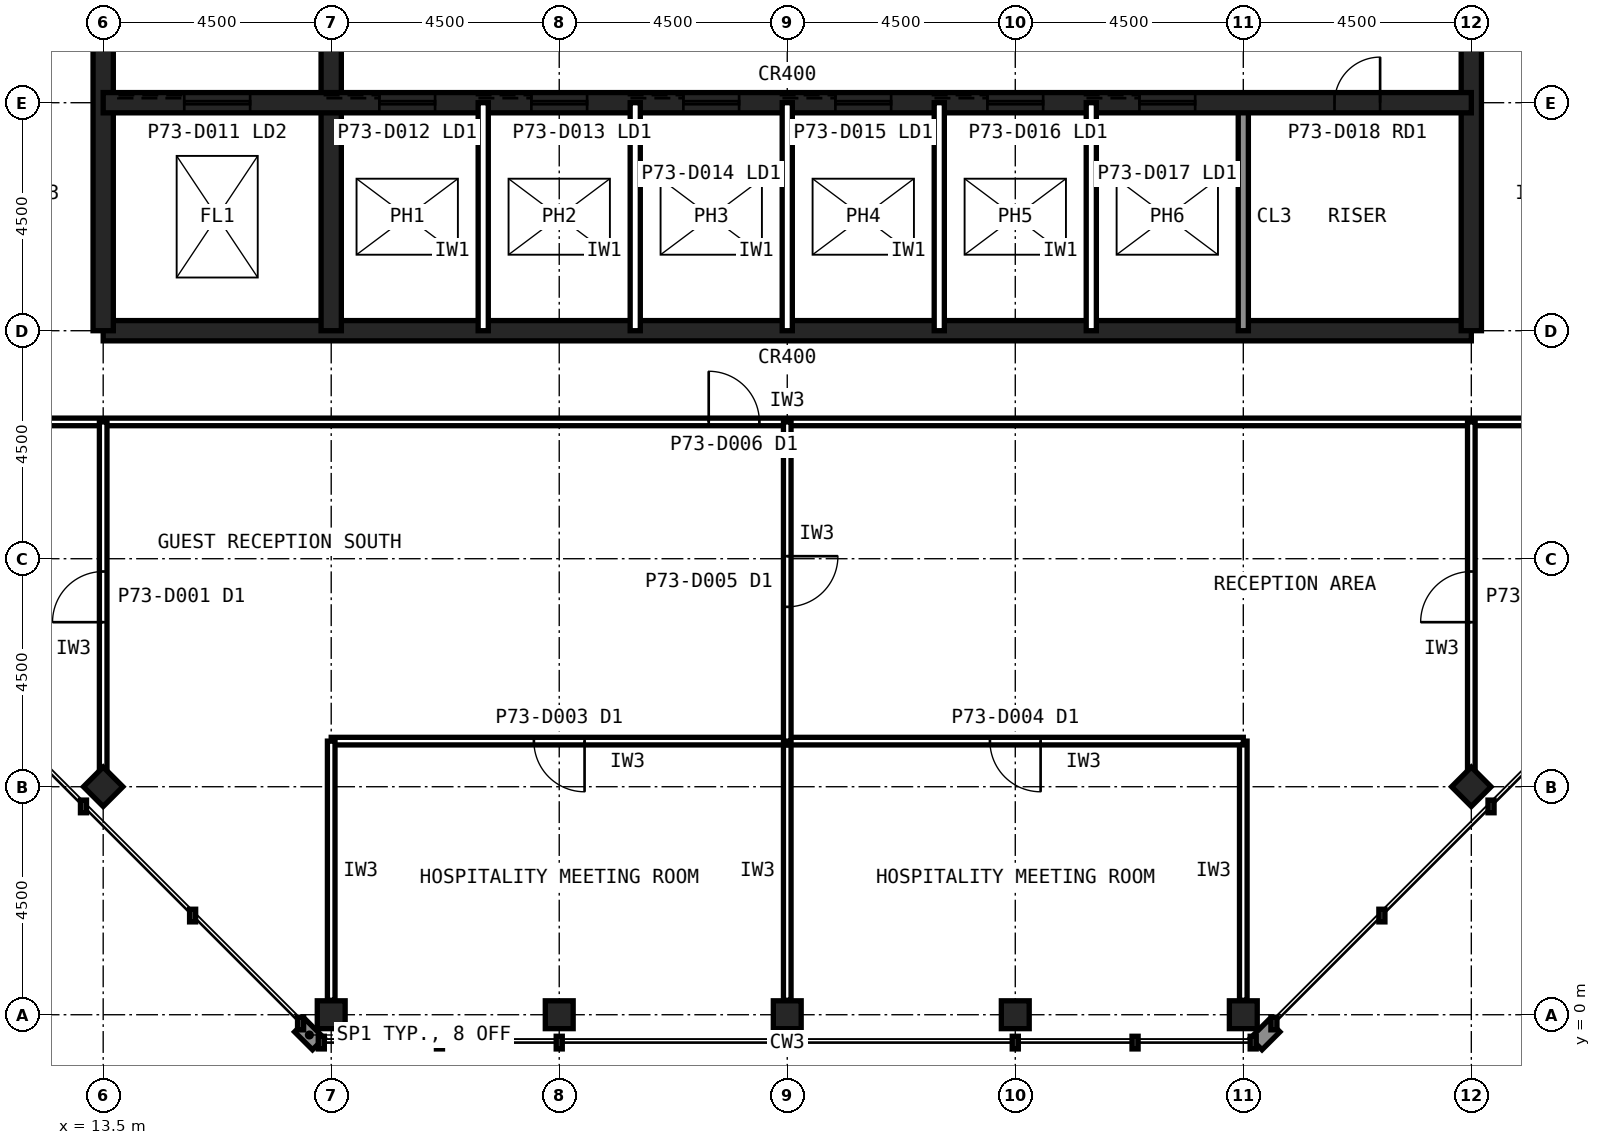
"""IFC4 building model, lengths in metres.
Left out: names, types, materials, properties, quantities, classifications, styles, units other than length and angle.
Written with IfcOpenShell. Run it as: python <this file> out.ifc"""

import sys

from ifc_helpers import new_model, si_unit, direction, frame, frame_2d, origin, origin_2d, place, context, subcontext, project, spatial, rectangle, hollow_rectangle, extrude, element, fill, save


model = new_model("IFC4")
c1 = context("Model", 3, precision=1e-05, world=origin(), true_north=direction((0.0, 1.0)))
c2 = subcontext(c1, "Body", "Model", "MODEL_VIEW")
j1 = project(units=[si_unit("LENGTHUNIT", "METRE"), si_unit("PLANEANGLEUNIT", "RADIAN")], contexts=[c1])
p1 = place(None, origin())
s1 = spatial("IfcSite", under=j1, at=p1, CompositionType="ELEMENT")
p2 = place(p1, origin())
s2 = spatial("IfcBuilding", under=s1, at=p2, CompositionType="ELEMENT")
p3 = place(p2, frame((0.0, 0.0, 302.6)))
s3 = spatial("IfcBuildingStorey", under=s2, at=p3, CompositionType="ELEMENT", Elevation=302.6)
for number, where, z_axis, x_axis in (
    (1, (18.0, 0.0, 0.0), (0.0, 0.0, 1.0), (1.0, 0.0, 0.0)),
    (2, (22.5, 0.0, 0.0), (0.0, 0.0, 1.0), (1.0, 0.0, 0.0)),
    (3, (27.0, 0.0, 0.0), (0.0, 0.0, 1.0), (1.0, 0.0, 0.0)),
    (4, (31.5, 0.0, 0.0), (0.0, 0.0, 1.0), (1.0, 0.0, 0.0)),
    (5, (36.0, 0.0, 0.0), (0.0, 0.0, 1.0), (1.0, 0.0, 0.0)),
    (6, (13.5, 4.5, 0.0), (0.0, 0.0, 1.0), (0.707, 0.707, 0.0)),
    (7, (40.5, 4.5, 0.0), (0.0, 0.0, 1.0), (0.707, 0.707, 0.0)),
):
    element("IfcColumn", number, at=place(p3, frame(where, z_axis=z_axis, x_axis=x_axis)), inside=s3, PredefinedType="COLUMN", context=c2, shape_type="SweptSolid", body=[
        extrude(hollow_rectangle(XDim=0.55, YDim=0.55, WallThickness=0.025, at=origin_2d()), origin(), (0.0, 0.0, 1.0), 4.0),
    ])
p4 = place(p3, frame((13.5, 13.5, 0.0), z_axis=(0.0, 0.0, 1.0), x_axis=(1.0, 0.0, 0.0)))
e8 = element("IfcWall", 8, at=p4, inside=s3, PredefinedType="SHEAR", context=c2, shape_type="SweptSolid", body=[
    extrude(rectangle(XDim=27.0, YDim=0.4, at=frame_2d((13.5, 0.0))), origin(), (0.0, 0.0, 1.0), 4.0),
])
p5 = place(p3, frame((40.5, 13.5, 0.0), z_axis=(0.0, 0.0, 1.0), x_axis=(0.0, 1.0, 0.0)))
e9 = element("IfcWall", 9, at=p5, inside=s3, PredefinedType="SHEAR", context=c2, shape_type="SweptSolid", body=[
    extrude(rectangle(XDim=27.0, YDim=0.4, at=frame_2d((13.5, 0.0))), origin(), (0.0, 0.0, 1.0), 4.0),
])
p6 = place(p5, frame((5.85, 0.0, 0.0)))
e10 = element("IfcOpeningElement", 10, at=p6, cuts=e9, PredefinedType="OPENING", context=c2, shape_type="SweptSolid", body=[
    extrude(rectangle(XDim=1.8, YDim=2.1, at=frame_2d((0.9, 1.05))), frame((0.0, 0.21, 0.0), z_axis=(0.0, -1.0, 0.0), x_axis=(1.0, 0.0, 0.0)), (0.0, 0.0, 1.0), 0.42),
])
p7 = place(p5, frame((19.65, 0.0, 0.0)))
e11 = element("IfcOpeningElement", 11, at=p7, cuts=e9, PredefinedType="OPENING", context=c2, shape_type="SweptSolid", body=[
    extrude(rectangle(XDim=1.2, YDim=2.1, at=frame_2d((0.6, 1.05))), frame((0.0, 0.21, 0.0), z_axis=(0.0, -1.0, 0.0), x_axis=(1.0, 0.0, 0.0)), (0.0, 0.0, 1.0), 0.42),
])
p8 = place(p3, frame((13.5, 40.5, 0.0), z_axis=(0.0, 0.0, 1.0), x_axis=(0.0, -1.0, 0.0)))
e12 = element("IfcWall", 12, at=p8, inside=s3, PredefinedType="SHEAR", context=c2, shape_type="SweptSolid", body=[
    extrude(rectangle(XDim=27.0, YDim=0.4, at=frame_2d((13.5, 0.0))), origin(), (0.0, 0.0, 1.0), 4.0),
])
p9 = place(p8, frame((19.65, 0.0, 0.0)))
e13 = element("IfcOpeningElement", 13, at=p9, cuts=e12, PredefinedType="OPENING", context=c2, shape_type="SweptSolid", body=[
    extrude(rectangle(XDim=1.2, YDim=2.1, at=frame_2d((0.6, 1.05))), frame((0.0, 0.21, 0.0), z_axis=(0.0, -1.0, 0.0), x_axis=(1.0, 0.0, 0.0)), (0.0, 0.0, 1.0), 0.42),
])
p10 = place(p8, frame((5.85, 0.0, 0.0)))
e14 = element("IfcOpeningElement", 14, at=p10, cuts=e12, PredefinedType="OPENING", context=c2, shape_type="SweptSolid", body=[
    extrude(rectangle(XDim=1.8, YDim=2.1, at=frame_2d((0.9, 1.05))), frame((0.0, 0.21, 0.0), z_axis=(0.0, -1.0, 0.0), x_axis=(1.0, 0.0, 0.0)), (0.0, 0.0, 1.0), 0.42),
])
p11 = place(p3, frame((18.0, 13.5, 0.0), z_axis=(0.0, 0.0, 1.0), x_axis=(0.0, 1.0, 0.0)))
e15 = element("IfcWall", 15, at=p11, inside=s3, PredefinedType="SHEAR", context=c2, shape_type="SweptSolid", body=[
    extrude(rectangle(XDim=18.0, YDim=0.4, at=frame_2d((9.0, 0.0))), origin(), (0.0, 0.0, 1.0), 4.0),
])
p12 = place(p3, frame((36.0, 13.5, 0.0), z_axis=(0.0, 0.0, 1.0), x_axis=(0.0, 1.0, 0.0)))
e16 = element("IfcWall", 16, at=p12, inside=s3, PredefinedType="SOLIDWALL", context=c2, shape_type="SweptSolid", body=[
    extrude(rectangle(XDim=4.5, YDim=0.2, at=frame_2d((2.25, 0.0))), origin(), (0.0, 0.0, 1.0), 3.84),
])
p13 = place(p3, frame((13.5, 18.0, 0.0), z_axis=(0.0, 0.0, 1.0), x_axis=(1.0, 0.0, 0.0)))
e17 = element("IfcWall", 17, at=p13, inside=s3, PredefinedType="SHEAR", context=c2, shape_type="SweptSolid", body=[
    extrude(rectangle(XDim=27.0, YDim=0.4, at=frame_2d((13.5, 0.0))), origin(), (0.0, 0.0, 1.0), 4.0),
])
p14 = place(p13, frame((24.3, 0.0, 0.0)))
e18 = element("IfcOpeningElement", 18, at=p14, cuts=e17, PredefinedType="OPENING", context=c2, shape_type="SweptSolid", body=[
    extrude(rectangle(XDim=0.9, YDim=2.1, at=frame_2d((0.45, 1.05))), frame((0.0, 0.21, 0.0), z_axis=(0.0, -1.0, 0.0), x_axis=(1.0, 0.0, 0.0)), (0.0, 0.0, 1.0), 0.42),
])
p15 = place(p13, frame((5.45, 0.0, 0.0)))
e19 = element("IfcOpeningElement", 19, at=p15, cuts=e17, PredefinedType="OPENING", context=c2, shape_type="SweptSolid", body=[
    extrude(rectangle(XDim=1.1, YDim=2.1, at=frame_2d((0.55, 1.05))), frame((0.0, 0.21, 0.0), z_axis=(0.0, -1.0, 0.0), x_axis=(1.0, 0.0, 0.0)), (0.0, 0.0, 1.0), 0.42),
])
p16 = place(p13, frame((8.45, 0.0, 0.0)))
e20 = element("IfcOpeningElement", 20, at=p16, cuts=e17, PredefinedType="OPENING", context=c2, shape_type="SweptSolid", body=[
    extrude(rectangle(XDim=1.1, YDim=2.1, at=frame_2d((0.55, 1.05))), frame((0.0, 0.21, 0.0), z_axis=(0.0, -1.0, 0.0), x_axis=(1.0, 0.0, 0.0)), (0.0, 0.0, 1.0), 0.42),
])
p17 = place(p13, frame((11.45, 0.0, 0.0)))
e21 = element("IfcOpeningElement", 21, at=p17, cuts=e17, PredefinedType="OPENING", context=c2, shape_type="SweptSolid", body=[
    extrude(rectangle(XDim=1.1, YDim=2.1, at=frame_2d((0.55, 1.05))), frame((0.0, 0.21, 0.0), z_axis=(0.0, -1.0, 0.0), x_axis=(1.0, 0.0, 0.0)), (0.0, 0.0, 1.0), 0.42),
])
p18 = place(p13, frame((14.45, 0.0, 0.0)))
e22 = element("IfcOpeningElement", 22, at=p18, cuts=e17, PredefinedType="OPENING", context=c2, shape_type="SweptSolid", body=[
    extrude(rectangle(XDim=1.1, YDim=2.1, at=frame_2d((0.55, 1.05))), frame((0.0, 0.21, 0.0), z_axis=(0.0, -1.0, 0.0), x_axis=(1.0, 0.0, 0.0)), (0.0, 0.0, 1.0), 0.42),
])
p19 = place(p13, frame((17.45, 0.0, 0.0)))
e23 = element("IfcOpeningElement", 23, at=p19, cuts=e17, PredefinedType="OPENING", context=c2, shape_type="SweptSolid", body=[
    extrude(rectangle(XDim=1.1, YDim=2.1, at=frame_2d((0.55, 1.05))), frame((0.0, 0.21, 0.0), z_axis=(0.0, -1.0, 0.0), x_axis=(1.0, 0.0, 0.0)), (0.0, 0.0, 1.0), 0.42),
])
p20 = place(p13, frame((20.45, 0.0, 0.0)))
e24 = element("IfcOpeningElement", 24, at=p20, cuts=e17, PredefinedType="OPENING", context=c2, shape_type="SweptSolid", body=[
    extrude(rectangle(XDim=1.1, YDim=2.1, at=frame_2d((0.55, 1.05))), frame((0.0, 0.21, 0.0), z_axis=(0.0, -1.0, 0.0), x_axis=(1.0, 0.0, 0.0)), (0.0, 0.0, 1.0), 0.42),
])
p21 = place(p13, frame((1.6, 0.0, 0.0)))
e25 = element("IfcOpeningElement", 25, at=p21, cuts=e17, PredefinedType="OPENING", context=c2, shape_type="SweptSolid", body=[
    extrude(rectangle(XDim=1.3, YDim=2.2, at=frame_2d((0.65, 1.1))), frame((0.0, 0.21, 0.0), z_axis=(0.0, -1.0, 0.0), x_axis=(1.0, 0.0, 0.0)), (0.0, 0.0, 1.0), 0.42),
])
for number, where, z_axis, x_axis in (
    (26, (21.0, 13.5, 0.0), (0.0, 0.0, 1.0), (0.0, 1.0, 0.0)),
    (27, (24.0, 13.5, 0.0), (0.0, 0.0, 1.0), (0.0, 1.0, 0.0)),
    (28, (27.0, 13.5, 0.0), (0.0, 0.0, 1.0), (0.0, 1.0, 0.0)),
    (29, (30.0, 13.5, 0.0), (0.0, 0.0, 1.0), (0.0, 1.0, 0.0)),
    (30, (33.0, 13.5, 0.0), (0.0, 0.0, 1.0), (0.0, 1.0, 0.0)),
):
    element("IfcWall", number, at=place(p3, frame(where, z_axis=z_axis, x_axis=x_axis)), inside=s3, PredefinedType="PARTITIONING", context=c2, shape_type="SweptSolid", body=[
        extrude(rectangle(XDim=4.5, YDim=0.2, at=frame_2d((2.25, 0.0))), origin(), (0.0, 0.0, 1.0), 3.84),
    ])
p22 = place(p3, frame((11.7, 11.7, 0.0), z_axis=(0.0, 0.0, 1.0), x_axis=(1.0, 0.0, 0.0)))
e31 = element("IfcWall", 31, at=p22, inside=s3, PredefinedType="PARTITIONING", context=c2, shape_type="SweptSolid", body=[
    extrude(rectangle(XDim=30.6, YDim=0.15, at=frame_2d((15.3, 0.0))), origin(), (0.0, 0.0, 1.0), 3.84),
])
p23 = place(p22, frame((13.75, 0.0, 0.0)))
e32 = element("IfcOpeningElement", 32, at=p23, cuts=e31, PredefinedType="OPENING", context=c2, shape_type="SweptSolid", body=[
    extrude(rectangle(XDim=1.0, YDim=2.1, at=frame_2d((0.5, 1.05))), frame((0.0, 0.085, 0.0), z_axis=(0.0, -1.0, 0.0), x_axis=(1.0, 0.0, 0.0)), (0.0, 0.0, 1.0), 0.17),
])
p24 = place(p3, frame((27.0, 0.285, 0.0), z_axis=(0.0, 0.0, 1.0), x_axis=(0.0, 1.0, 0.0)))
e33 = element("IfcWall", 33, at=p24, inside=s3, PredefinedType="PARTITIONING", context=c2, shape_type="SweptSolid", body=[
    extrude(rectangle(XDim=5.115, YDim=0.15, at=frame_2d((2.558, 0.0))), origin(), (0.0, 0.0, 1.0), 2.989),
])
p25 = place(p3, frame((27.0, 5.4, 0.0), z_axis=(0.0, 0.0, 1.0), x_axis=(-1.0, 0.0, 0.0)))
e34 = element("IfcWall", 34, at=p25, inside=s3, PredefinedType="PARTITIONING", context=c2, shape_type="SweptSolid", body=[
    extrude(rectangle(XDim=9.0, YDim=0.15, at=frame_2d((4.5, 0.0))), origin(), (0.0, 0.0, 1.0), 3.84),
])
p26 = place(p25, frame((4.0, 0.0, 0.0)))
e35 = element("IfcOpeningElement", 35, at=p26, cuts=e34, PredefinedType="OPENING", context=c2, shape_type="SweptSolid", body=[
    extrude(rectangle(XDim=1.0, YDim=2.1, at=frame_2d((0.5, 1.05))), frame((0.0, 0.085, 0.0), z_axis=(0.0, -1.0, 0.0), x_axis=(1.0, 0.0, 0.0)), (0.0, 0.0, 1.0), 0.17),
])
for number, where, z_axis, x_axis in (
    (36, (18.0, 5.4, 0.0), (0.0, 0.0, 1.0), (0.0, -1.0, 0.0)),
    (37, (36.0, 0.285, 0.0), (0.0, 0.0, 1.0), (0.0, 1.0, 0.0)),
):
    element("IfcWall", number, at=place(p3, frame(where, z_axis=z_axis, x_axis=x_axis)), inside=s3, PredefinedType="PARTITIONING", context=c2, shape_type="SweptSolid", body=[
        extrude(rectangle(XDim=5.115, YDim=0.15, at=frame_2d((2.558, 0.0))), origin(), (0.0, 0.0, 1.0), 2.989),
    ])
p27 = place(p3, frame((36.0, 5.4, 0.0), z_axis=(0.0, 0.0, 1.0), x_axis=(-1.0, 0.0, 0.0)))
e38 = element("IfcWall", 38, at=p27, inside=s3, PredefinedType="PARTITIONING", context=c2, shape_type="SweptSolid", body=[
    extrude(rectangle(XDim=9.0, YDim=0.15, at=frame_2d((4.5, 0.0))), origin(), (0.0, 0.0, 1.0), 3.84),
])
p28 = place(p27, frame((4.0, 0.0, 0.0)))
e39 = element("IfcOpeningElement", 39, at=p28, cuts=e38, PredefinedType="OPENING", context=c2, shape_type="SweptSolid", body=[
    extrude(rectangle(XDim=1.0, YDim=2.1, at=frame_2d((0.5, 1.05))), frame((0.0, 0.085, 0.0), z_axis=(0.0, -1.0, 0.0), x_axis=(1.0, 0.0, 0.0)), (0.0, 0.0, 1.0), 0.17),
])
p29 = place(p3, frame((40.5, 4.795, 0.0), z_axis=(0.0, 0.0, 1.0), x_axis=(0.0, 1.0, 0.0)))
e40 = element("IfcWall", 40, at=p29, inside=s3, PredefinedType="PARTITIONING", context=c2, shape_type="SweptSolid", body=[
    extrude(rectangle(XDim=6.905, YDim=0.15, at=frame_2d((3.453, 0.0))), origin(), (0.0, 0.0, 1.0), 2.989),
])
p30 = place(p29, frame((2.952, 0.0, 0.0)))
e41 = element("IfcOpeningElement", 41, at=p30, cuts=e40, PredefinedType="OPENING", context=c2, shape_type="SweptSolid", body=[
    extrude(rectangle(XDim=1.0, YDim=2.1, at=frame_2d((0.5, 1.05))), frame((0.0, 0.085, 0.0), z_axis=(0.0, -1.0, 0.0), x_axis=(1.0, 0.0, 0.0)), (0.0, 0.0, 1.0), 0.17),
])
p31 = place(p3, frame((13.5, 4.795, 0.0), z_axis=(0.0, 0.0, 1.0), x_axis=(0.0, 1.0, 0.0)))
e42 = element("IfcWall", 42, at=p31, inside=s3, PredefinedType="PARTITIONING", context=c2, shape_type="SweptSolid", body=[
    extrude(rectangle(XDim=6.905, YDim=0.15, at=frame_2d((3.453, 0.0))), origin(), (0.0, 0.0, 1.0), 2.989),
])
p32 = place(p31, frame((2.952, 0.0, 0.0)))
e43 = element("IfcOpeningElement", 43, at=p32, cuts=e42, PredefinedType="OPENING", context=c2, shape_type="SweptSolid", body=[
    extrude(rectangle(XDim=1.0, YDim=2.1, at=frame_2d((0.5, 1.05))), frame((0.0, 0.085, 0.0), z_axis=(0.0, -1.0, 0.0), x_axis=(1.0, 0.0, 0.0)), (0.0, 0.0, 1.0), 0.17),
])
p33 = place(p3, frame((27.0, 11.7, 0.0), z_axis=(0.0, 0.0, 1.0), x_axis=(0.0, -1.0, 0.0)))
e44 = element("IfcWall", 44, at=p33, inside=s3, PredefinedType="PARTITIONING", context=c2, shape_type="SweptSolid", body=[
    extrude(rectangle(XDim=6.3, YDim=0.15, at=frame_2d((3.15, 0.0))), origin(), (0.0, 0.0, 1.0), 2.989),
])
p34 = place(p33, frame((2.65, 0.0, 0.0)))
e45 = element("IfcOpeningElement", 45, at=p34, cuts=e44, PredefinedType="OPENING", context=c2, shape_type="SweptSolid", body=[
    extrude(rectangle(XDim=1.0, YDim=2.1, at=frame_2d((0.5, 1.05))), frame((0.0, 0.085, 0.0), z_axis=(0.0, -1.0, 0.0), x_axis=(1.0, 0.0, 0.0)), (0.0, 0.0, 1.0), 0.17),
])
p35 = place(p14, origin())
e46 = element("IfcDoor", 46, at=p35, inside=s3, OperationType="SINGLE_SWING_RIGHT", PredefinedType="DOOR", context=c2, shape_type="SweptSolid", body=[
    extrude(rectangle(XDim=0.9, YDim=2.1, at=frame_2d((0.45, 1.05))), frame((0.0, 0.025, 0.0), z_axis=(0.0, -1.0, 0.0), x_axis=(1.0, 0.0, 0.0)), (0.0, 0.0, 1.0), 0.05),
])
fill(e18, e46)
p36 = place(p15, origin())
e47 = element("IfcDoor", 47, at=p36, inside=s3, OperationType="SLIDING_TO_LEFT", PredefinedType="DOOR", context=c2, shape_type="SweptSolid", body=[
    extrude(rectangle(XDim=1.1, YDim=2.1, at=frame_2d((0.55, 1.05))), frame((0.0, 0.025, 0.0), z_axis=(0.0, -1.0, 0.0), x_axis=(1.0, 0.0, 0.0)), (0.0, 0.0, 1.0), 0.05),
])
fill(e19, e47)
p37 = place(p16, origin())
e48 = element("IfcDoor", 48, at=p37, inside=s3, OperationType="SLIDING_TO_LEFT", PredefinedType="DOOR", context=c2, shape_type="SweptSolid", body=[
    extrude(rectangle(XDim=1.1, YDim=2.1, at=frame_2d((0.55, 1.05))), frame((0.0, 0.025, 0.0), z_axis=(0.0, -1.0, 0.0), x_axis=(1.0, 0.0, 0.0)), (0.0, 0.0, 1.0), 0.05),
])
fill(e20, e48)
p38 = place(p17, origin())
e49 = element("IfcDoor", 49, at=p38, inside=s3, OperationType="SLIDING_TO_LEFT", PredefinedType="DOOR", context=c2, shape_type="SweptSolid", body=[
    extrude(rectangle(XDim=1.1, YDim=2.1, at=frame_2d((0.55, 1.05))), frame((0.0, 0.025, 0.0), z_axis=(0.0, -1.0, 0.0), x_axis=(1.0, 0.0, 0.0)), (0.0, 0.0, 1.0), 0.05),
])
fill(e21, e49)
p39 = place(p18, origin())
e50 = element("IfcDoor", 50, at=p39, inside=s3, OperationType="SLIDING_TO_LEFT", PredefinedType="DOOR", context=c2, shape_type="SweptSolid", body=[
    extrude(rectangle(XDim=1.1, YDim=2.1, at=frame_2d((0.55, 1.05))), frame((0.0, 0.025, 0.0), z_axis=(0.0, -1.0, 0.0), x_axis=(1.0, 0.0, 0.0)), (0.0, 0.0, 1.0), 0.05),
])
fill(e22, e50)
p40 = place(p19, origin())
e51 = element("IfcDoor", 51, at=p40, inside=s3, OperationType="SLIDING_TO_LEFT", PredefinedType="DOOR", context=c2, shape_type="SweptSolid", body=[
    extrude(rectangle(XDim=1.1, YDim=2.1, at=frame_2d((0.55, 1.05))), frame((0.0, 0.025, 0.0), z_axis=(0.0, -1.0, 0.0), x_axis=(1.0, 0.0, 0.0)), (0.0, 0.0, 1.0), 0.05),
])
fill(e23, e51)
p41 = place(p20, origin())
e52 = element("IfcDoor", 52, at=p41, inside=s3, OperationType="SLIDING_TO_LEFT", PredefinedType="DOOR", context=c2, shape_type="SweptSolid", body=[
    extrude(rectangle(XDim=1.1, YDim=2.1, at=frame_2d((0.55, 1.05))), frame((0.0, 0.025, 0.0), z_axis=(0.0, -1.0, 0.0), x_axis=(1.0, 0.0, 0.0)), (0.0, 0.0, 1.0), 0.05),
])
fill(e24, e52)
p42 = place(p21, origin())
e53 = element("IfcDoor", 53, at=p42, inside=s3, OperationType="SLIDING_TO_LEFT", PredefinedType="DOOR", context=c2, shape_type="SweptSolid", body=[
    extrude(rectangle(XDim=1.3, YDim=2.2, at=frame_2d((0.65, 1.1))), frame((0.0, 0.025, 0.0), z_axis=(0.0, -1.0, 0.0), x_axis=(1.0, 0.0, 0.0)), (0.0, 0.0, 1.0), 0.05),
])
fill(e25, e53)
p43 = place(p23, origin())
e54 = element("IfcDoor", 54, at=p43, inside=s3, OperationType="SINGLE_SWING_LEFT", PredefinedType="DOOR", context=c2, shape_type="SweptSolid", body=[
    extrude(rectangle(XDim=1.0, YDim=2.1, at=frame_2d((0.5, 1.05))), frame((0.0, 0.025, 0.0), z_axis=(0.0, -1.0, 0.0), x_axis=(1.0, 0.0, 0.0)), (0.0, 0.0, 1.0), 0.05),
])
fill(e32, e54)
p44 = place(p26, origin())
e55 = element("IfcDoor", 55, at=p44, inside=s3, OperationType="SINGLE_SWING_LEFT", PredefinedType="DOOR", context=c2, shape_type="SweptSolid", body=[
    extrude(rectangle(XDim=1.0, YDim=2.1, at=frame_2d((0.5, 1.05))), frame((0.0, 0.025, 0.0), z_axis=(0.0, -1.0, 0.0), x_axis=(1.0, 0.0, 0.0)), (0.0, 0.0, 1.0), 0.05),
])
fill(e35, e55)
p45 = place(p28, origin())
e56 = element("IfcDoor", 56, at=p45, inside=s3, OperationType="SINGLE_SWING_LEFT", PredefinedType="DOOR", context=c2, shape_type="SweptSolid", body=[
    extrude(rectangle(XDim=1.0, YDim=2.1, at=frame_2d((0.5, 1.05))), frame((0.0, 0.025, 0.0), z_axis=(0.0, -1.0, 0.0), x_axis=(1.0, 0.0, 0.0)), (0.0, 0.0, 1.0), 0.05),
])
fill(e39, e56)
p46 = place(p30, origin())
e57 = element("IfcDoor", 57, at=p46, inside=s3, OperationType="SINGLE_SWING_LEFT", PredefinedType="DOOR", context=c2, shape_type="SweptSolid", body=[
    extrude(rectangle(XDim=1.0, YDim=2.1, at=frame_2d((0.5, 1.05))), frame((0.0, 0.025, 0.0), z_axis=(0.0, -1.0, 0.0), x_axis=(1.0, 0.0, 0.0)), (0.0, 0.0, 1.0), 0.05),
])
fill(e41, e57)
p47 = place(p32, origin())
e58 = element("IfcDoor", 58, at=p47, inside=s3, OperationType="SINGLE_SWING_LEFT", PredefinedType="DOOR", context=c2, shape_type="SweptSolid", body=[
    extrude(rectangle(XDim=1.0, YDim=2.1, at=frame_2d((0.5, 1.05))), frame((0.0, 0.025, 0.0), z_axis=(0.0, -1.0, 0.0), x_axis=(1.0, 0.0, 0.0)), (0.0, 0.0, 1.0), 0.05),
])
fill(e43, e58)
p48 = place(p34, origin())
e59 = element("IfcDoor", 59, at=p48, inside=s3, OperationType="SINGLE_SWING_LEFT", PredefinedType="DOOR", context=c2, shape_type="SweptSolid", body=[
    extrude(rectangle(XDim=1.0, YDim=2.1, at=frame_2d((0.5, 1.05))), frame((0.0, 0.025, 0.0), z_axis=(0.0, -1.0, 0.0), x_axis=(1.0, 0.0, 0.0)), (0.0, 0.0, 1.0), 0.05),
])
fill(e45, e59)
save(model, sys.argv[1])
